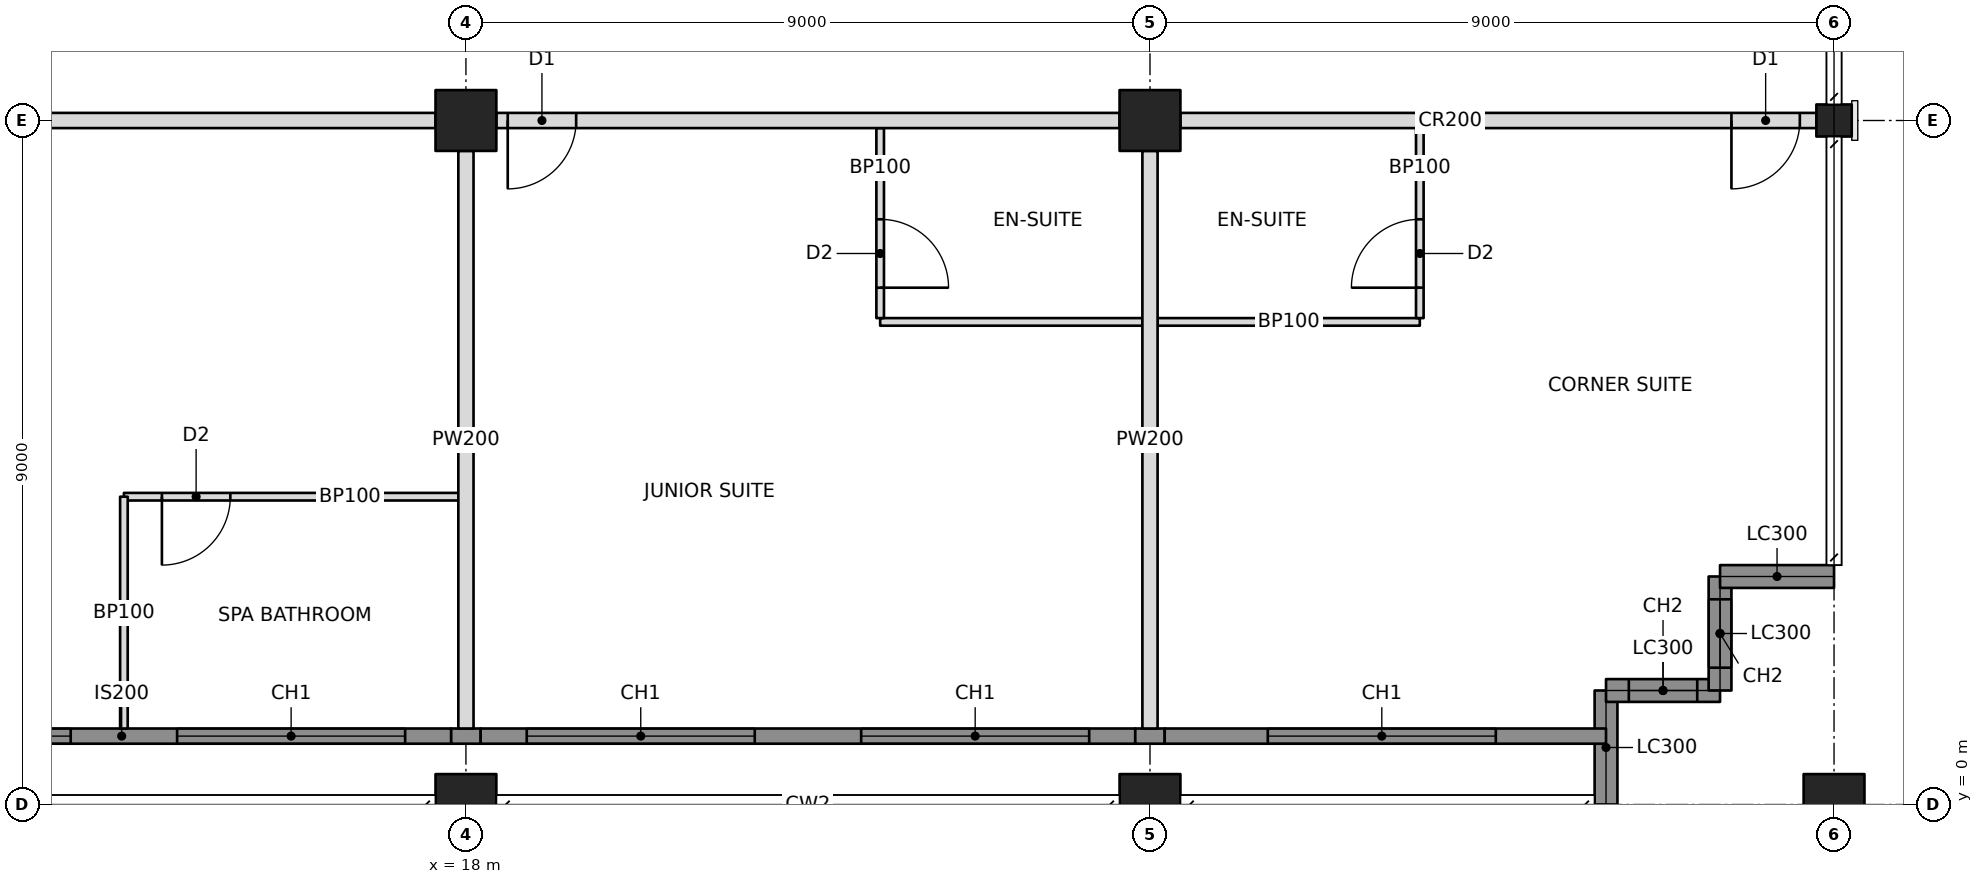
"""IFC4 building model, lengths in metres.
Left out: names, types, materials, properties, quantities, classifications, styles, units other than length and angle.
Written with IfcOpenShell. Run it as: python <this file> out.ifc"""

import sys

from ifc_helpers import new_model, si_unit, direction, frame, frame_2d, origin, origin_2d, place, context, subcontext, project, spatial, rectangle, hollow_rectangle, i_section, extrude, element, fill, save


model = new_model("IFC4")
c1 = context("Model", 3, precision=1e-05, world=origin(), true_north=direction((0.0, 1.0)))
c2 = subcontext(c1, "Body", "Model", "MODEL_VIEW")
j1 = project(units=[si_unit("LENGTHUNIT", "METRE"), si_unit("PLANEANGLEUNIT", "RADIAN")], contexts=[c1])
p1 = place(None, origin())
s1 = spatial("IfcSite", under=j1, at=p1, CompositionType="ELEMENT")
p2 = place(p1, origin())
s2 = spatial("IfcBuilding", under=s1, at=p2, CompositionType="ELEMENT")
p3 = place(p2, frame((0.0, 0.0, 241.0)))
s3 = spatial("IfcBuildingStorey", under=s2, at=p3, CompositionType="ELEMENT", Elevation=241.0)
p4 = place(p3, frame((18.0, 0.0, 0.0), z_axis=(0.0, 0.0, 1.0), x_axis=(1.0, 0.0, 0.0)))
e1 = element("IfcColumn", 1, at=p4, inside=s3, PredefinedType="COLUMN", context=c2, shape_type="SweptSolid", body=[
    extrude(hollow_rectangle(XDim=0.8, YDim=0.8, WallThickness=0.05, at=origin_2d()), origin(), (0.0, 0.0, 1.0), 3.6),
])
p5 = place(p3, frame((18.0, 9.0, 0.0), z_axis=(0.0, 0.0, 1.0), x_axis=(1.0, 0.0, 0.0)))
e2 = element("IfcColumn", 2, at=p5, inside=s3, PredefinedType="COLUMN", context=c2, shape_type="SweptSolid", body=[
    extrude(hollow_rectangle(XDim=0.8, YDim=0.8, WallThickness=0.04, at=origin_2d()), origin(), (0.0, 0.0, 1.0), 3.6),
])
p6 = place(p3, frame((27.0, 0.0, 0.0), z_axis=(0.0, 0.0, 1.0), x_axis=(1.0, 0.0, 0.0)))
e3 = element("IfcColumn", 3, at=p6, inside=s3, PredefinedType="COLUMN", context=c2, shape_type="SweptSolid", body=[
    extrude(hollow_rectangle(XDim=0.8, YDim=0.8, WallThickness=0.05, at=origin_2d()), origin(), (0.0, 0.0, 1.0), 3.6),
])
p7 = place(p3, frame((27.0, 9.0, 0.0), z_axis=(0.0, 0.0, 1.0), x_axis=(1.0, 0.0, 0.0)))
e4 = element("IfcColumn", 4, at=p7, inside=s3, PredefinedType="COLUMN", context=c2, shape_type="SweptSolid", body=[
    extrude(hollow_rectangle(XDim=0.8, YDim=0.8, WallThickness=0.04, at=origin_2d()), origin(), (0.0, 0.0, 1.0), 3.6),
])
p8 = place(p3, frame((36.0, 0.0, 0.0), z_axis=(0.0, 0.0, 1.0), x_axis=(1.0, 0.0, 0.0)))
e5 = element("IfcColumn", 5, at=p8, inside=s3, PredefinedType="COLUMN", context=c2, shape_type="SweptSolid", body=[
    extrude(hollow_rectangle(XDim=0.8, YDim=0.8, WallThickness=0.05, at=origin_2d()), origin(), (0.0, 0.0, 1.0), 3.6),
])
p9 = place(p3, frame((36.0, 9.0, 0.0), z_axis=(0.0, 0.0, 1.0), x_axis=(0.0, 1.0, 0.0)))
e6 = element("IfcColumn", 6, at=p9, inside=s3, PredefinedType="COLUMN", context=c2, shape_type="SweptSolid", body=[
    extrude(i_section(OverallWidth=0.422, OverallDepth=0.465, WebThickness=0.045, FlangeThickness=0.073, at=origin_2d()), origin(), (0.0, 0.0, 1.0), 3.6),
])
p10 = place(p3, frame((33.0, 0.0, 0.0), z_axis=(0.0, 0.0, 1.0), x_axis=(0.0, 1.0, 0.0)))
e7 = element("IfcWall", 7, at=p10, inside=s3, PredefinedType="SOLIDWALL", context=c2, shape_type="SweptSolid", body=[
    extrude(rectangle(XDim=1.5, YDim=0.3, at=frame_2d((0.75, 0.0))), origin(), (0.0, 0.0, 1.0), 2.62),
])
p11 = place(p3, frame((33.0, 1.5, 0.0), z_axis=(0.0, 0.0, 1.0), x_axis=(1.0, 0.0, 0.0)))
e8 = element("IfcWall", 8, at=p11, inside=s3, PredefinedType="SOLIDWALL", context=c2, shape_type="SweptSolid", body=[
    extrude(rectangle(XDim=1.5, YDim=0.3, at=frame_2d((0.75, 0.0))), origin(), (0.0, 0.0, 1.0), 3.4),
])
p12 = place(p11, frame((0.3, 0.0, 0.6)))
e9 = element("IfcOpeningElement", 9, at=p12, cuts=e8, PredefinedType="OPENING", context=c2, shape_type="SweptSolid", body=[
    extrude(rectangle(XDim=0.9, YDim=2.2, at=frame_2d((0.45, 1.1))), frame((0.0, 0.16, 0.0), z_axis=(0.0, -1.0, 0.0), x_axis=(1.0, 0.0, 0.0)), (0.0, 0.0, 1.0), 0.32),
])
p13 = place(p3, frame((34.5, 1.5, 0.0), z_axis=(0.0, 0.0, 1.0), x_axis=(0.0, 1.0, 0.0)))
e10 = element("IfcWall", 10, at=p13, inside=s3, PredefinedType="SOLIDWALL", context=c2, shape_type="SweptSolid", body=[
    extrude(rectangle(XDim=1.5, YDim=0.3, at=frame_2d((0.75, 0.0))), origin(), (0.0, 0.0, 1.0), 3.4),
])
p14 = place(p13, frame((0.3, 0.0, 0.6)))
e11 = element("IfcOpeningElement", 11, at=p14, cuts=e10, PredefinedType="OPENING", context=c2, shape_type="SweptSolid", body=[
    extrude(rectangle(XDim=0.9, YDim=2.2, at=frame_2d((0.45, 1.1))), frame((0.0, 0.16, 0.0), z_axis=(0.0, -1.0, 0.0), x_axis=(1.0, 0.0, 0.0)), (0.0, 0.0, 1.0), 0.32),
])
p15 = place(p3, frame((34.5, 3.0, 0.0), z_axis=(0.0, 0.0, 1.0), x_axis=(1.0, 0.0, 0.0)))
e12 = element("IfcWall", 12, at=p15, inside=s3, PredefinedType="SOLIDWALL", context=c2, shape_type="SweptSolid", body=[
    extrude(rectangle(XDim=1.5, YDim=0.3, at=frame_2d((0.75, 0.0))), origin(), (0.0, 0.0, 1.0), 2.62),
])
p16 = place(p3, frame((9.4, 9.0, 0.0), z_axis=(0.0, 0.0, 1.0), x_axis=(1.0, 0.0, 0.0)))
e13 = element("IfcWall", 13, at=p16, inside=s3, PredefinedType="PARTITIONING", context=c2, shape_type="SweptSolid", body=[
    extrude(rectangle(XDim=8.2, YDim=0.2, at=frame_2d((4.1, 0.0))), origin(), (0.0, 0.0, 1.0), 2.605),
])
p17 = place(p16, frame((0.15, 0.0, 0.0)))
e14 = element("IfcOpeningElement", 14, at=p17, cuts=e13, PredefinedType="OPENING", context=c2, shape_type="SweptSolid", body=[
    extrude(rectangle(XDim=0.9, YDim=2.1, at=frame_2d((0.45, 1.05))), frame((0.0, 0.11, 0.0), z_axis=(0.0, -1.0, 0.0), x_axis=(1.0, 0.0, 0.0)), (0.0, 0.0, 1.0), 0.22),
])
p18 = place(p3, frame((18.4, 9.0, 0.0), z_axis=(0.0, 0.0, 1.0), x_axis=(1.0, 0.0, 0.0)))
e15 = element("IfcWall", 15, at=p18, inside=s3, PredefinedType="PARTITIONING", context=c2, shape_type="SweptSolid", body=[
    extrude(rectangle(XDim=8.2, YDim=0.2, at=frame_2d((4.1, 0.0))), origin(), (0.0, 0.0, 1.0), 2.605),
])
p19 = place(p18, frame((0.15, 0.0, 0.0)))
e16 = element("IfcOpeningElement", 16, at=p19, cuts=e15, PredefinedType="OPENING", context=c2, shape_type="SweptSolid", body=[
    extrude(rectangle(XDim=0.9, YDim=2.1, at=frame_2d((0.45, 1.05))), frame((0.0, 0.11, 0.0), z_axis=(0.0, -1.0, 0.0), x_axis=(1.0, 0.0, 0.0)), (0.0, 0.0, 1.0), 0.22),
])
p20 = place(p3, frame((27.4, 9.0, 0.0), z_axis=(0.0, 0.0, 1.0), x_axis=(1.0, 0.0, 0.0)))
e17 = element("IfcWall", 17, at=p20, inside=s3, PredefinedType="PARTITIONING", context=c2, shape_type="SweptSolid", body=[
    extrude(rectangle(XDim=8.368, YDim=0.2, at=frame_2d((4.184, 0.0))), origin(), (0.0, 0.0, 1.0), 2.605),
])
p21 = place(p20, frame((7.25, 0.0, 0.0)))
e18 = element("IfcOpeningElement", 18, at=p21, cuts=e17, PredefinedType="OPENING", context=c2, shape_type="SweptSolid", body=[
    extrude(rectangle(XDim=0.9, YDim=2.1, at=frame_2d((0.45, 1.05))), frame((0.0, 0.11, 0.0), z_axis=(0.0, -1.0, 0.0), x_axis=(1.0, 0.0, 0.0)), (0.0, 0.0, 1.0), 0.22),
])
for number, where, z_axis, x_axis in (
    (19, (18.0, 8.6, 0.0), (0.0, 0.0, 1.0), (0.0, -1.0, 0.0)),
    (20, (27.0, 8.6, 0.0), (0.0, 0.0, 1.0), (0.0, -1.0, 0.0)),
):
    element("IfcWall", number, at=place(p3, frame(where, z_axis=z_axis, x_axis=x_axis)), inside=s3, PredefinedType="PARTITIONING", context=c2, shape_type="SweptSolid", body=[
        extrude(rectangle(XDim=7.6, YDim=0.2, at=frame_2d((3.8, 0.0))), origin(), (0.0, 0.0, 1.0), 2.605),
    ])
p22 = place(p3, frame((13.5, 4.05, 0.0), z_axis=(0.0, 0.0, 1.0), x_axis=(1.0, 0.0, 0.0)))
e21 = element("IfcWall", 21, at=p22, inside=s3, PredefinedType="PARTITIONING", context=c2, shape_type="SweptSolid", body=[
    extrude(rectangle(XDim=4.4, YDim=0.1, at=frame_2d((2.2, 0.0))), origin(), (0.0, 0.0, 1.0), 2.604),
])
p23 = place(p22, frame((0.5, 0.0, 0.0)))
e22 = element("IfcOpeningElement", 22, at=p23, cuts=e21, PredefinedType="OPENING", context=c2, shape_type="SweptSolid", body=[
    extrude(rectangle(XDim=0.9, YDim=2.1, at=frame_2d((0.45, 1.05))), frame((0.0, 0.06, 0.0), z_axis=(0.0, -1.0, 0.0), x_axis=(1.0, 0.0, 0.0)), (0.0, 0.0, 1.0), 0.12),
])
p24 = place(p3, frame((13.5, 4.05, 0.0), z_axis=(0.0, 0.0, 1.0), x_axis=(0.0, -1.0, 0.0)))
e23 = element("IfcWall", 23, at=p24, inside=s3, PredefinedType="PARTITIONING", context=c2, shape_type="SweptSolid", body=[
    extrude(rectangle(XDim=3.05, YDim=0.1, at=frame_2d((1.525, 0.0))), origin(), (0.0, 0.0, 1.0), 3.4),
])
p25 = place(p3, frame((23.45, 6.35, 0.0), z_axis=(0.0, 0.0, 1.0), x_axis=(1.0, 0.0, 0.0)))
e24 = element("IfcWall", 24, at=p25, inside=s3, PredefinedType="PARTITIONING", context=c2, shape_type="SweptSolid", body=[
    extrude(rectangle(XDim=3.45, YDim=0.1, at=frame_2d((1.725, 0.0))), origin(), (0.0, 0.0, 1.0), 2.604),
])
p26 = place(p3, frame((23.45, 8.9, 0.0), z_axis=(0.0, 0.0, 1.0), x_axis=(0.0, -1.0, 0.0)))
e25 = element("IfcWall", 25, at=p26, inside=s3, PredefinedType="PARTITIONING", context=c2, shape_type="SweptSolid", body=[
    extrude(rectangle(XDim=2.5, YDim=0.1, at=frame_2d((1.25, 0.0))), origin(), (0.0, 0.0, 1.0), 2.604),
])
p27 = place(p26, frame((1.2, 0.0, 0.0)))
e26 = element("IfcOpeningElement", 26, at=p27, cuts=e25, PredefinedType="OPENING", context=c2, shape_type="SweptSolid", body=[
    extrude(rectangle(XDim=0.9, YDim=2.1, at=frame_2d((0.45, 1.05))), frame((0.0, 0.06, 0.0), z_axis=(0.0, -1.0, 0.0), x_axis=(1.0, 0.0, 0.0)), (0.0, 0.0, 1.0), 0.12),
])
p28 = place(p3, frame((27.1, 6.35, 0.0), z_axis=(0.0, 0.0, 1.0), x_axis=(1.0, 0.0, 0.0)))
e27 = element("IfcWall", 27, at=p28, inside=s3, PredefinedType="PARTITIONING", context=c2, shape_type="SweptSolid", body=[
    extrude(rectangle(XDim=3.45, YDim=0.1, at=frame_2d((1.725, 0.0))), origin(), (0.0, 0.0, 1.0), 2.604),
])
p29 = place(p3, frame((30.55, 8.9, 0.0), z_axis=(0.0, 0.0, 1.0), x_axis=(0.0, -1.0, 0.0)))
e28 = element("IfcWall", 28, at=p29, inside=s3, PredefinedType="PARTITIONING", context=c2, shape_type="SweptSolid", body=[
    extrude(rectangle(XDim=2.5, YDim=0.1, at=frame_2d((1.25, 0.0))), origin(), (0.0, 0.0, 1.0), 2.604),
])
p30 = place(p29, frame((1.2, 0.0, 0.0)))
e29 = element("IfcOpeningElement", 29, at=p30, cuts=e28, PredefinedType="OPENING", context=c2, shape_type="SweptSolid", body=[
    extrude(rectangle(XDim=0.9, YDim=2.1, at=frame_2d((0.45, 1.05))), frame((0.0, 0.06, 0.0), z_axis=(0.0, -1.0, 0.0), x_axis=(1.0, 0.0, 0.0)), (0.0, 0.0, 1.0), 0.12),
])
p31 = place(p3, frame((9.135, 0.9, 0.0), z_axis=(0.0, 0.0, 1.0), x_axis=(1.0, 0.0, 0.0)))
e30 = element("IfcWall", 30, at=p31, inside=s3, PredefinedType="SOLIDWALL", context=c2, shape_type="SweptSolid", body=[
    extrude(rectangle(XDim=8.671, YDim=0.2, at=frame_2d((4.335, 0.0))), origin(), (0.0, 0.0, 1.0), 3.4),
])
p32 = place(p31, frame((0.665, 0.0, 0.6)))
e31 = element("IfcOpeningElement", 31, at=p32, cuts=e30, PredefinedType="OPENING", context=c2, shape_type="SweptSolid", body=[
    extrude(rectangle(XDim=3.0, YDim=2.2, at=frame_2d((1.5, 1.1))), frame((0.0, 0.11, 0.0), z_axis=(0.0, -1.0, 0.0), x_axis=(1.0, 0.0, 0.0)), (0.0, 0.0, 1.0), 0.22),
])
p33 = place(p31, frame((5.065, 0.0, 0.6)))
e32 = element("IfcOpeningElement", 32, at=p33, cuts=e30, PredefinedType="OPENING", context=c2, shape_type="SweptSolid", body=[
    extrude(rectangle(XDim=3.0, YDim=2.2, at=frame_2d((1.5, 1.1))), frame((0.0, 0.11, 0.0), z_axis=(0.0, -1.0, 0.0), x_axis=(1.0, 0.0, 0.0)), (0.0, 0.0, 1.0), 0.22),
])
p34 = place(p3, frame((17.806, 0.9, 0.0), z_axis=(0.0, 0.0, 1.0), x_axis=(1.0, 0.0, 0.0)))
e33 = element("IfcWall", 33, at=p34, inside=s3, PredefinedType="SOLIDWALL", context=c2, shape_type="SweptSolid", body=[
    extrude(rectangle(XDim=0.388, YDim=0.2, at=frame_2d((0.194, 0.0))), origin(), (0.0, 0.0, 1.0), 2.604),
])
p35 = place(p3, frame((18.194, 0.9, 0.0), z_axis=(0.0, 0.0, 1.0), x_axis=(1.0, 0.0, 0.0)))
e34 = element("IfcWall", 34, at=p35, inside=s3, PredefinedType="SOLIDWALL", context=c2, shape_type="SweptSolid", body=[
    extrude(rectangle(XDim=8.612, YDim=0.2, at=frame_2d((4.306, 0.0))), origin(), (0.0, 0.0, 1.0), 3.4),
])
p36 = place(p35, frame((0.606, 0.0, 0.6)))
e35 = element("IfcOpeningElement", 35, at=p36, cuts=e34, PredefinedType="OPENING", context=c2, shape_type="SweptSolid", body=[
    extrude(rectangle(XDim=3.0, YDim=2.2, at=frame_2d((1.5, 1.1))), frame((0.0, 0.11, 0.0), z_axis=(0.0, -1.0, 0.0), x_axis=(1.0, 0.0, 0.0)), (0.0, 0.0, 1.0), 0.22),
])
p37 = place(p35, frame((5.006, 0.0, 0.6)))
e36 = element("IfcOpeningElement", 36, at=p37, cuts=e34, PredefinedType="OPENING", context=c2, shape_type="SweptSolid", body=[
    extrude(rectangle(XDim=3.0, YDim=2.2, at=frame_2d((1.5, 1.1))), frame((0.0, 0.11, 0.0), z_axis=(0.0, -1.0, 0.0), x_axis=(1.0, 0.0, 0.0)), (0.0, 0.0, 1.0), 0.22),
])
p38 = place(p3, frame((26.806, 0.9, 0.0), z_axis=(0.0, 0.0, 1.0), x_axis=(1.0, 0.0, 0.0)))
e37 = element("IfcWall", 37, at=p38, inside=s3, PredefinedType="SOLIDWALL", context=c2, shape_type="SweptSolid", body=[
    extrude(rectangle(XDim=0.388, YDim=0.2, at=frame_2d((0.194, 0.0))), origin(), (0.0, 0.0, 1.0), 2.604),
])
p39 = place(p3, frame((27.194, 0.9, 0.0), z_axis=(0.0, 0.0, 1.0), x_axis=(1.0, 0.0, 0.0)))
e38 = element("IfcWall", 38, at=p39, inside=s3, PredefinedType="SOLIDWALL", context=c2, shape_type="SweptSolid", body=[
    extrude(rectangle(XDim=5.806, YDim=0.2, at=frame_2d((2.903, 0.0))), origin(), (0.0, 0.0, 1.0), 3.4),
])
p40 = place(p39, frame((1.356, 0.0, 0.6)))
e39 = element("IfcOpeningElement", 39, at=p40, cuts=e38, PredefinedType="OPENING", context=c2, shape_type="SweptSolid", body=[
    extrude(rectangle(XDim=3.0, YDim=2.2, at=frame_2d((1.5, 1.1))), frame((0.0, 0.11, 0.0), z_axis=(0.0, -1.0, 0.0), x_axis=(1.0, 0.0, 0.0)), (0.0, 0.0, 1.0), 0.22),
])
p41 = place(p12, origin())
e40 = element("IfcWindow", 40, at=p41, inside=s3, PartitioningType="SINGLE_PANEL", PredefinedType="WINDOW", context=c2, shape_type="SweptSolid", body=[
    extrude(rectangle(XDim=0.9, YDim=2.2, at=frame_2d((0.45, 1.1))), frame((0.0, 0.03, 0.0), z_axis=(0.0, -1.0, 0.0), x_axis=(1.0, 0.0, 0.0)), (0.0, 0.0, 1.0), 0.06),
])
fill(e9, e40)
p42 = place(p14, origin())
e41 = element("IfcWindow", 41, at=p42, inside=s3, PartitioningType="SINGLE_PANEL", PredefinedType="WINDOW", context=c2, shape_type="SweptSolid", body=[
    extrude(rectangle(XDim=0.9, YDim=2.2, at=frame_2d((0.45, 1.1))), frame((0.0, 0.03, 0.0), z_axis=(0.0, -1.0, 0.0), x_axis=(1.0, 0.0, 0.0)), (0.0, 0.0, 1.0), 0.06),
])
fill(e11, e41)
p43 = place(p32, origin())
e42 = element("IfcWindow", 42, at=p43, inside=s3, PartitioningType="TRIPLE_PANEL_VERTICAL", PredefinedType="WINDOW", context=c2, shape_type="SweptSolid", body=[
    extrude(rectangle(XDim=3.0, YDim=2.2, at=frame_2d((1.5, 1.1))), frame((0.0, 0.03, 0.0), z_axis=(0.0, -1.0, 0.0), x_axis=(1.0, 0.0, 0.0)), (0.0, 0.0, 1.0), 0.06),
])
fill(e31, e42)
p44 = place(p33, origin())
e43 = element("IfcWindow", 43, at=p44, inside=s3, PartitioningType="TRIPLE_PANEL_VERTICAL", PredefinedType="WINDOW", context=c2, shape_type="SweptSolid", body=[
    extrude(rectangle(XDim=3.0, YDim=2.2, at=frame_2d((1.5, 1.1))), frame((0.0, 0.03, 0.0), z_axis=(0.0, -1.0, 0.0), x_axis=(1.0, 0.0, 0.0)), (0.0, 0.0, 1.0), 0.06),
])
fill(e32, e43)
p45 = place(p36, origin())
e44 = element("IfcWindow", 44, at=p45, inside=s3, PartitioningType="TRIPLE_PANEL_VERTICAL", PredefinedType="WINDOW", context=c2, shape_type="SweptSolid", body=[
    extrude(rectangle(XDim=3.0, YDim=2.2, at=frame_2d((1.5, 1.1))), frame((0.0, 0.03, 0.0), z_axis=(0.0, -1.0, 0.0), x_axis=(1.0, 0.0, 0.0)), (0.0, 0.0, 1.0), 0.06),
])
fill(e35, e44)
p46 = place(p37, origin())
e45 = element("IfcWindow", 45, at=p46, inside=s3, PartitioningType="TRIPLE_PANEL_VERTICAL", PredefinedType="WINDOW", context=c2, shape_type="SweptSolid", body=[
    extrude(rectangle(XDim=3.0, YDim=2.2, at=frame_2d((1.5, 1.1))), frame((0.0, 0.03, 0.0), z_axis=(0.0, -1.0, 0.0), x_axis=(1.0, 0.0, 0.0)), (0.0, 0.0, 1.0), 0.06),
])
fill(e36, e45)
p47 = place(p40, origin())
e46 = element("IfcWindow", 46, at=p47, inside=s3, PartitioningType="TRIPLE_PANEL_VERTICAL", PredefinedType="WINDOW", context=c2, shape_type="SweptSolid", body=[
    extrude(rectangle(XDim=3.0, YDim=2.2, at=frame_2d((1.5, 1.1))), frame((0.0, 0.03, 0.0), z_axis=(0.0, -1.0, 0.0), x_axis=(1.0, 0.0, 0.0)), (0.0, 0.0, 1.0), 0.06),
])
fill(e39, e46)
p48 = place(p23, frame((0.9, 0.0, 0.0), z_axis=(0.0, 0.0, 1.0), x_axis=(-1.0, 0.0, 0.0)))
e47 = element("IfcDoor", 47, at=p48, inside=s3, OperationType="SINGLE_SWING_RIGHT", PredefinedType="DOOR", context=c2, shape_type="SweptSolid", body=[
    extrude(rectangle(XDim=0.9, YDim=2.1, at=frame_2d((0.45, 1.05))), frame((0.0, 0.025, 0.0), z_axis=(0.0, -1.0, 0.0), x_axis=(1.0, 0.0, 0.0)), (0.0, 0.0, 1.0), 0.05),
])
fill(e22, e47)
p49 = place(p27, origin())
e48 = element("IfcDoor", 48, at=p49, inside=s3, OperationType="SINGLE_SWING_RIGHT", PredefinedType="DOOR", context=c2, shape_type="SweptSolid", body=[
    extrude(rectangle(XDim=0.9, YDim=2.1, at=frame_2d((0.45, 1.05))), frame((0.0, 0.025, 0.0), z_axis=(0.0, -1.0, 0.0), x_axis=(1.0, 0.0, 0.0)), (0.0, 0.0, 1.0), 0.05),
])
fill(e26, e48)
p50 = place(p19, frame((0.9, 0.0, 0.0), z_axis=(0.0, 0.0, 1.0), x_axis=(-1.0, 0.0, 0.0)))
e49 = element("IfcDoor", 49, at=p50, inside=s3, OperationType="SINGLE_SWING_RIGHT", PredefinedType="DOOR", context=c2, shape_type="SweptSolid", body=[
    extrude(rectangle(XDim=0.9, YDim=2.1, at=frame_2d((0.45, 1.05))), frame((0.0, 0.025, 0.0), z_axis=(0.0, -1.0, 0.0), x_axis=(1.0, 0.0, 0.0)), (0.0, 0.0, 1.0), 0.05),
])
fill(e16, e49)
p51 = place(p30, frame((0.9, 0.0, 0.0), z_axis=(0.0, 0.0, 1.0), x_axis=(-1.0, 0.0, 0.0)))
e50 = element("IfcDoor", 50, at=p51, inside=s3, OperationType="SINGLE_SWING_LEFT", PredefinedType="DOOR", context=c2, shape_type="SweptSolid", body=[
    extrude(rectangle(XDim=0.9, YDim=2.1, at=frame_2d((0.45, 1.05))), frame((0.0, 0.025, 0.0), z_axis=(0.0, -1.0, 0.0), x_axis=(1.0, 0.0, 0.0)), (0.0, 0.0, 1.0), 0.05),
])
fill(e29, e50)
p52 = place(p21, frame((0.9, 0.0, 0.0), z_axis=(0.0, 0.0, 1.0), x_axis=(-1.0, 0.0, 0.0)))
e51 = element("IfcDoor", 51, at=p52, inside=s3, OperationType="SINGLE_SWING_RIGHT", PredefinedType="DOOR", context=c2, shape_type="SweptSolid", body=[
    extrude(rectangle(XDim=0.9, YDim=2.1, at=frame_2d((0.45, 1.05))), frame((0.0, 0.025, 0.0), z_axis=(0.0, -1.0, 0.0), x_axis=(1.0, 0.0, 0.0)), (0.0, 0.0, 1.0), 0.05),
])
fill(e18, e51)
save(model, sys.argv[1])
